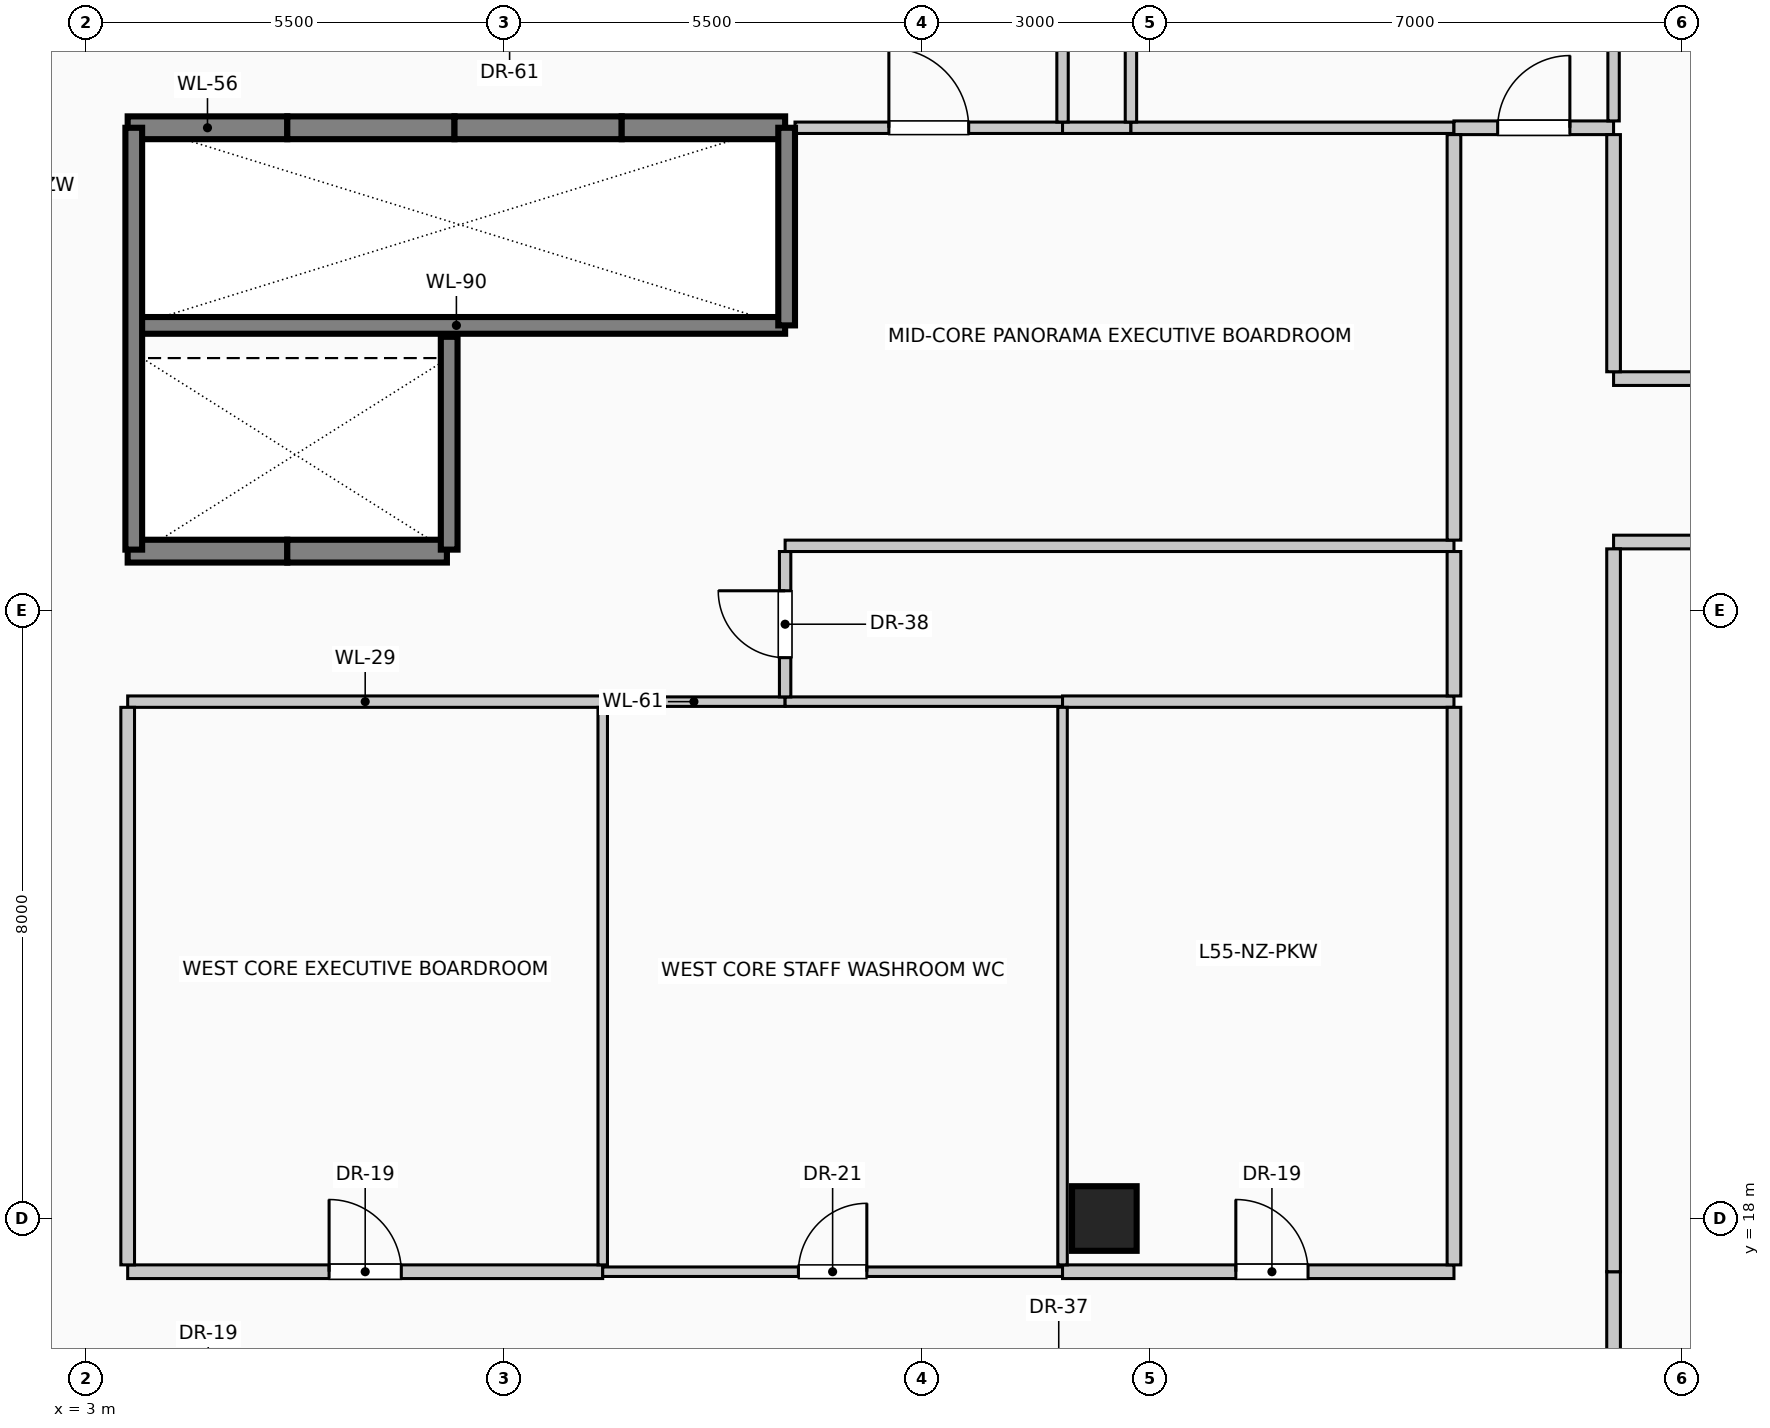
"""IFC4 building model, lengths in metres.
Left out: names, types, materials, properties, quantities, classifications, styles, units other than length and angle.
Written with IfcOpenShell. Run it as: python <this file> out.ifc"""

import sys

from ifc_helpers import new_model, si_unit, direction, frame, frame_2d, origin, origin_2d, place, context, subcontext, project, spatial, rectangle, circle, extrude, element, fill, save


model = new_model("IFC4")
c1 = context("Model", 3, precision=1e-05, world=origin(), true_north=direction((0.0, 1.0)))
c2 = subcontext(c1, "Body", "Model", "MODEL_VIEW")
j1 = project(units=[si_unit("LENGTHUNIT", "METRE"), si_unit("PLANEANGLEUNIT", "RADIAN")], contexts=[c1])
p1 = place(None, origin())
s1 = spatial("IfcSite", under=j1, at=p1, CompositionType="ELEMENT")
p2 = place(p1, origin())
s2 = spatial("IfcBuilding", under=s1, at=p2, CompositionType="ELEMENT")
p3 = place(p2, frame((0.0, 0.0, 226.6)))
s3 = spatial("IfcBuildingStorey", under=s2, at=p3, CompositionType="ELEMENT", Elevation=226.6)
p4 = place(p3, frame((16.4, 18.0, 0.0), z_axis=(0.0, 0.0, 1.0), x_axis=(1.0, 0.0, 0.0)))
e1 = element("IfcColumn", 1, at=p4, inside=s3, PredefinedType="COLUMN", context=c2, shape_type="SweptSolid", body=[
    extrude(circle(Radius=0.425, at=origin_2d()), origin(), (0.0, 0.0, 1.0), 4.0),
])
p5 = place(p3, frame((3.55, 32.35, 0.0), z_axis=(0.0, 0.0, 1.0), x_axis=(1.0, 0.0, 0.0)))
e2 = element("IfcWall", 2, at=p5, inside=s3, PredefinedType="SOLIDWALL", context=c2, shape_type="SweptSolid", body=[
    extrude(rectangle(XDim=2.1, YDim=0.3, at=frame_2d((1.05, 0.0))), origin(), (0.0, 0.0, 1.0), 4.0),
])
p6 = place(p3, frame((5.65, 32.35, 0.0), z_axis=(0.0, 0.0, 1.0), x_axis=(1.0, 0.0, 0.0)))
e3 = element("IfcWall", 3, at=p6, inside=s3, PredefinedType="SOLIDWALL", context=c2, shape_type="SweptSolid", body=[
    extrude(rectangle(XDim=2.2, YDim=0.3, at=frame_2d((1.1, 0.0))), origin(), (0.0, 0.0, 1.0), 4.0),
])
p7 = place(p3, frame((7.85, 32.35, 0.0), z_axis=(0.0, 0.0, 1.0), x_axis=(1.0, 0.0, 0.0)))
e4 = element("IfcWall", 4, at=p7, inside=s3, PredefinedType="SOLIDWALL", context=c2, shape_type="SweptSolid", body=[
    extrude(rectangle(XDim=2.2, YDim=0.3, at=frame_2d((1.1, 0.0))), origin(), (0.0, 0.0, 1.0), 4.0),
])
p8 = place(p3, frame((10.05, 32.35, 0.0), z_axis=(0.0, 0.0, 1.0), x_axis=(1.0, 0.0, 0.0)))
e5 = element("IfcWall", 5, at=p8, inside=s3, PredefinedType="SOLIDWALL", context=c2, shape_type="SweptSolid", body=[
    extrude(rectangle(XDim=2.15, YDim=0.3, at=frame_2d((1.075, 0.0))), origin(), (0.0, 0.0, 1.0), 4.0),
])
p9 = place(p3, frame((5.65, 26.78, 0.0), z_axis=(0.0, 0.0, 1.0), x_axis=(-1.0, 0.0, 0.0)))
e6 = element("IfcWall", 6, at=p9, inside=s3, PredefinedType="SOLIDWALL", context=c2, shape_type="SweptSolid", body=[
    extrude(rectangle(XDim=2.1, YDim=0.3, at=frame_2d((1.05, 0.0))), origin(), (0.0, 0.0, 1.0), 4.0),
])
p10 = place(p3, frame((7.75, 26.78, 0.0), z_axis=(0.0, 0.0, 1.0), x_axis=(-1.0, 0.0, 0.0)))
e7 = element("IfcWall", 7, at=p10, inside=s3, PredefinedType="SOLIDWALL", context=c2, shape_type="SweptSolid", body=[
    extrude(rectangle(XDim=2.1, YDim=0.3, at=frame_2d((1.05, 0.0))), origin(), (0.0, 0.0, 1.0), 4.0),
])
p11 = place(p3, frame((3.55, 29.75, 0.0), z_axis=(0.0, 0.0, 1.0), x_axis=(1.0, 0.0, 0.0)))
e8 = element("IfcWall", 8, at=p11, inside=s3, PredefinedType="SOLIDWALL", context=c2, shape_type="SweptSolid", body=[
    extrude(rectangle(XDim=8.65, YDim=0.22, at=frame_2d((4.325, 0.0))), origin(), (0.0, 0.0, 1.0), 4.0),
])
p12 = place(p3, frame((3.63, 26.8, 0.0), z_axis=(0.0, 0.0, 1.0), x_axis=(0.0, 1.0, 0.0)))
e9 = element("IfcWall", 9, at=p12, inside=s3, PredefinedType="SOLIDWALL", context=c2, shape_type="SweptSolid", body=[
    extrude(rectangle(XDim=5.55, YDim=0.22, at=frame_2d((2.775, 0.0))), origin(), (0.0, 0.0, 1.0), 4.0),
])
p13 = place(p3, frame((7.78, 26.8, 0.0), z_axis=(0.0, 0.0, 1.0), x_axis=(0.0, 1.0, 0.0)))
e10 = element("IfcWall", 10, at=p13, inside=s3, PredefinedType="SOLIDWALL", context=c2, shape_type="SweptSolid", body=[
    extrude(rectangle(XDim=2.8, YDim=0.22, at=frame_2d((1.4, 0.0))), origin(), (0.0, 0.0, 1.0), 4.0),
])
p14 = place(p3, frame((12.22, 29.75, 0.0), z_axis=(0.0, 0.0, 1.0), x_axis=(0.0, 1.0, 0.0)))
e11 = element("IfcWall", 11, at=p14, inside=s3, PredefinedType="SOLIDWALL", context=c2, shape_type="SweptSolid", body=[
    extrude(rectangle(XDim=2.6, YDim=0.22, at=frame_2d((1.3, 0.0))), origin(), (0.0, 0.0, 1.0), 4.0),
])
p15 = place(p3, frame((3.55, 17.3, 0.0), z_axis=(0.0, 0.0, 1.0), x_axis=(1.0, 0.0, 0.0)))
e12 = element("IfcWall", 12, at=p15, inside=s3, PredefinedType="PARTITIONING", context=c2, shape_type="SweptSolid", body=[
    extrude(rectangle(XDim=6.25, YDim=0.18, at=frame_2d((3.125, 0.0))), origin(), (0.0, 0.0, 1.0), 3.75),
])
p16 = place(p15, frame((2.65, 0.0, 0.0)))
e13 = element("IfcOpeningElement", 13, at=p16, cuts=e12, PredefinedType="OPENING", context=c2, shape_type="SweptSolid", body=[
    extrude(rectangle(XDim=0.95, YDim=2.15, at=frame_2d((0.475, 1.075))), frame((0.0, 0.1, 0.0), z_axis=(0.0, -1.0, 0.0), x_axis=(1.0, 0.0, 0.0)), (0.0, 0.0, 1.0), 0.2),
])
p17 = place(p3, frame((9.8, 17.3, 0.0), z_axis=(0.0, 0.0, 1.0), x_axis=(1.0, 0.0, 0.0)))
e14 = element("IfcWall", 14, at=p17, inside=s3, PredefinedType="PARTITIONING", context=c2, shape_type="SweptSolid", body=[
    extrude(rectangle(XDim=6.05, YDim=0.125, at=frame_2d((3.025, 0.0))), origin(), (0.0, 0.0, 1.0), 3.75),
])
p18 = place(p17, frame((2.575, 0.0, 0.0)))
e15 = element("IfcOpeningElement", 15, at=p18, cuts=e14, PredefinedType="OPENING", context=c2, shape_type="SweptSolid", body=[
    extrude(rectangle(XDim=0.9, YDim=2.1, at=frame_2d((0.45, 1.05))), frame((0.0, 0.073, 0.0), z_axis=(0.0, -1.0, 0.0), x_axis=(1.0, 0.0, 0.0)), (0.0, 0.0, 1.0), 0.145),
])
p19 = place(p3, frame((15.85, 17.3, 0.0), z_axis=(0.0, 0.0, 1.0), x_axis=(1.0, 0.0, 0.0)))
e16 = element("IfcWall", 16, at=p19, inside=s3, PredefinedType="PARTITIONING", context=c2, shape_type="SweptSolid", body=[
    extrude(rectangle(XDim=5.15, YDim=0.18, at=frame_2d((2.575, 0.0))), origin(), (0.0, 0.0, 1.0), 3.75),
])
p20 = place(p19, frame((2.28, 0.0, 0.0)))
e17 = element("IfcOpeningElement", 17, at=p20, cuts=e16, PredefinedType="OPENING", context=c2, shape_type="SweptSolid", body=[
    extrude(rectangle(XDim=0.95, YDim=2.15, at=frame_2d((0.475, 1.075))), frame((0.0, 0.1, 0.0), z_axis=(0.0, -1.0, 0.0), x_axis=(1.0, 0.0, 0.0)), (0.0, 0.0, 1.0), 0.2),
])
p21 = place(p3, frame((3.55, 24.8, 0.0), z_axis=(0.0, 0.0, 1.0), x_axis=(1.0, 0.0, 0.0)))
e18 = element("IfcWall", 18, at=p21, inside=s3, PredefinedType="PARTITIONING", context=c2, shape_type="SweptSolid", body=[
    extrude(rectangle(XDim=6.25, YDim=0.15, at=frame_2d((3.125, 0.0))), origin(), (0.0, 0.0, 1.0), 3.75),
])
p22 = place(p3, frame((9.8, 24.8, 0.0), z_axis=(0.0, 0.0, 1.0), x_axis=(1.0, 0.0, 0.0)))
e19 = element("IfcWall", 19, at=p22, inside=s3, PredefinedType="PARTITIONING", context=c2, shape_type="SweptSolid", body=[
    extrude(rectangle(XDim=2.4, YDim=0.125, at=frame_2d((1.2, 0.0))), origin(), (0.0, 0.0, 1.0), 3.75),
])
p23 = place(p3, frame((12.2, 24.8, 0.0), z_axis=(0.0, 0.0, 1.0), x_axis=(1.0, 0.0, 0.0)))
e20 = element("IfcWall", 20, at=p23, inside=s3, PredefinedType="PARTITIONING", context=c2, shape_type="SweptSolid", body=[
    extrude(rectangle(XDim=3.65, YDim=0.125, at=frame_2d((1.825, 0.0))), origin(), (0.0, 0.0, 1.0), 3.75),
])
p24 = place(p3, frame((15.85, 24.8, 0.0), z_axis=(0.0, 0.0, 1.0), x_axis=(1.0, 0.0, 0.0)))
e21 = element("IfcWall", 21, at=p24, inside=s3, PredefinedType="PARTITIONING", context=c2, shape_type="SweptSolid", body=[
    extrude(rectangle(XDim=5.15, YDim=0.15, at=frame_2d((2.575, 0.0))), origin(), (0.0, 0.0, 1.0), 3.75),
])
p25 = place(p3, frame((12.2, 26.85, 0.0), z_axis=(0.0, 0.0, 1.0), x_axis=(1.0, 0.0, 0.0)))
e22 = element("IfcWall", 22, at=p25, inside=s3, PredefinedType="PARTITIONING", context=c2, shape_type="SweptSolid", body=[
    extrude(rectangle(XDim=8.8, YDim=0.15, at=frame_2d((4.4, 0.0))), origin(), (0.0, 0.0, 1.0), 3.75),
])
p26 = place(p3, frame((23.1, 26.9, 0.0), z_axis=(0.0, 0.0, 1.0), x_axis=(1.0, 0.0, 0.0)))
e23 = element("IfcWall", 23, at=p26, inside=s3, PredefinedType="PARTITIONING", context=c2, shape_type="SweptSolid", body=[
    extrude(rectangle(XDim=9.1, YDim=0.18, at=frame_2d((4.55, 0.0))), origin(), (0.0, 0.0, 1.0), 3.75),
])
p27 = place(p26, frame((4.075, 0.0, 0.0)))
e24 = element("IfcOpeningElement", 24, at=p27, cuts=e23, PredefinedType="OPENING", context=c2, shape_type="SweptSolid", body=[
    extrude(rectangle(XDim=0.95, YDim=2.15, at=frame_2d((0.475, 1.075))), frame((0.0, 0.1, 0.0), z_axis=(0.0, -1.0, 0.0), x_axis=(1.0, 0.0, 0.0)), (0.0, 0.0, 1.0), 0.2),
])
p28 = place(p3, frame((23.1, 29.05, 0.0), z_axis=(0.0, 0.0, 1.0), x_axis=(1.0, 0.0, 0.0)))
e25 = element("IfcWall", 25, at=p28, inside=s3, PredefinedType="PARTITIONING", context=c2, shape_type="SweptSolid", body=[
    extrude(rectangle(XDim=3.66, YDim=0.18, at=frame_2d((1.83, 0.0))), origin(), (0.0, 0.0, 1.0), 3.75),
])
p29 = place(p28, frame((1.355, 0.0, 0.0)))
e26 = element("IfcOpeningElement", 26, at=p29, cuts=e25, PredefinedType="OPENING", context=c2, shape_type="SweptSolid", body=[
    extrude(rectangle(XDim=0.95, YDim=2.15, at=frame_2d((0.475, 1.075))), frame((0.0, 0.1, 0.0), z_axis=(0.0, -1.0, 0.0), x_axis=(1.0, 0.0, 0.0)), (0.0, 0.0, 1.0), 0.2),
])
p30 = place(p3, frame((12.33, 32.35, 0.0), z_axis=(0.0, 0.0, 1.0), x_axis=(1.0, 0.0, 0.0)))
e27 = element("IfcWall", 27, at=p30, inside=s3, PredefinedType="PARTITIONING", context=c2, shape_type="SweptSolid", body=[
    extrude(rectangle(XDim=3.52, YDim=0.15, at=frame_2d((1.76, 0.0))), origin(), (0.0, 0.0, 1.0), 3.75),
])
p31 = place(p30, frame((1.235, 0.0, 0.0)))
e28 = element("IfcOpeningElement", 28, at=p31, cuts=e27, PredefinedType="OPENING", context=c2, shape_type="SweptSolid", body=[
    extrude(rectangle(XDim=1.05, YDim=2.15, at=frame_2d((0.525, 1.075))), frame((0.0, 0.085, 0.0), z_axis=(0.0, -1.0, 0.0), x_axis=(1.0, 0.0, 0.0)), (0.0, 0.0, 1.0), 0.17),
])
p32 = place(p3, frame((15.85, 32.35, 0.0), z_axis=(0.0, 0.0, 1.0), x_axis=(1.0, 0.0, 0.0)))
e29 = element("IfcWall", 29, at=p32, inside=s3, PredefinedType="PARTITIONING", context=c2, shape_type="SweptSolid", body=[
    extrude(rectangle(XDim=0.9, YDim=0.15, at=frame_2d((0.45, 0.0))), origin(), (0.0, 0.0, 1.0), 3.75),
])
p33 = place(p3, frame((16.75, 32.35, 0.0), z_axis=(0.0, 0.0, 1.0), x_axis=(1.0, 0.0, 0.0)))
e30 = element("IfcWall", 30, at=p33, inside=s3, PredefinedType="PARTITIONING", context=c2, shape_type="SweptSolid", body=[
    extrude(rectangle(XDim=4.25, YDim=0.15, at=frame_2d((2.125, 0.0))), origin(), (0.0, 0.0, 1.0), 3.75),
])
p34 = place(p3, frame((21.0, 32.35, 0.0), z_axis=(0.0, 0.0, 1.0), x_axis=(1.0, 0.0, 0.0)))
e31 = element("IfcWall", 31, at=p34, inside=s3, PredefinedType="PARTITIONING", context=c2, shape_type="SweptSolid", body=[
    extrude(rectangle(XDim=2.1, YDim=0.18, at=frame_2d((1.05, 0.0))), origin(), (0.0, 0.0, 1.0), 3.75),
])
p35 = place(p34, frame((0.575, 0.0, 0.0)))
e32 = element("IfcOpeningElement", 32, at=p35, cuts=e31, PredefinedType="OPENING", context=c2, shape_type="SweptSolid", body=[
    extrude(rectangle(XDim=0.95, YDim=2.15, at=frame_2d((0.475, 1.075))), frame((0.0, 0.1, 0.0), z_axis=(0.0, -1.0, 0.0), x_axis=(1.0, 0.0, 0.0)), (0.0, 0.0, 1.0), 0.2),
])
p36 = place(p3, frame((3.55, 17.39, 0.0), z_axis=(0.0, 0.0, 1.0), x_axis=(0.0, 1.0, 0.0)))
e33 = element("IfcWall", 33, at=p36, inside=s3, PredefinedType="PARTITIONING", context=c2, shape_type="SweptSolid", body=[
    extrude(rectangle(XDim=7.335, YDim=0.18, at=frame_2d((3.667, 0.0))), origin(), (0.0, 0.0, 1.0), 3.75),
])
p37 = place(p3, frame((9.8, 17.39, 0.0), z_axis=(0.0, 0.0, 1.0), x_axis=(0.0, 1.0, 0.0)))
e34 = element("IfcWall", 34, at=p37, inside=s3, PredefinedType="PARTITIONING", context=c2, shape_type="SweptSolid", body=[
    extrude(rectangle(XDim=7.335, YDim=0.125, at=frame_2d((3.667, 0.0))), origin(), (0.0, 0.0, 1.0), 3.75),
])
p38 = place(p3, frame((12.2, 24.863, 0.0), z_axis=(0.0, 0.0, 1.0), x_axis=(0.0, 1.0, 0.0)))
e35 = element("IfcWall", 35, at=p38, inside=s3, PredefinedType="PARTITIONING", context=c2, shape_type="SweptSolid", body=[
    extrude(rectangle(XDim=1.912, YDim=0.15, at=frame_2d((0.956, 0.0))), origin(), (0.0, 0.0, 1.0), 3.75),
])
p39 = place(p38, frame((0.516, 0.0, 0.0)))
e36 = element("IfcOpeningElement", 36, at=p39, cuts=e35, PredefinedType="OPENING", context=c2, shape_type="SweptSolid", body=[
    extrude(rectangle(XDim=0.88, YDim=2.1, at=frame_2d((0.44, 1.05))), frame((0.0, 0.085, 0.0), z_axis=(0.0, -1.0, 0.0), x_axis=(1.0, 0.0, 0.0)), (0.0, 0.0, 1.0), 0.17),
])
p40 = place(p3, frame((15.85, 17.39, 0.0), z_axis=(0.0, 0.0, 1.0), x_axis=(0.0, 1.0, 0.0)))
e37 = element("IfcWall", 37, at=p40, inside=s3, PredefinedType="PARTITIONING", context=c2, shape_type="SweptSolid", body=[
    extrude(rectangle(XDim=7.335, YDim=0.125, at=frame_2d((3.667, 0.0))), origin(), (0.0, 0.0, 1.0), 3.75),
])
p41 = place(p3, frame((15.85, 32.425, 0.0), z_axis=(0.0, 0.0, 1.0), x_axis=(0.0, 1.0, 0.0)))
e38 = element("IfcWall", 38, at=p41, inside=s3, PredefinedType="PARTITIONING", context=c2, shape_type="SweptSolid", body=[
    extrude(rectangle(XDim=1.725, YDim=0.15, at=frame_2d((0.862, 0.0))), origin(), (0.0, 0.0, 1.0), 3.75),
])
p42 = place(p3, frame((16.75, 32.425, 0.0), z_axis=(0.0, 0.0, 1.0), x_axis=(0.0, 1.0, 0.0)))
e39 = element("IfcWall", 39, at=p42, inside=s3, PredefinedType="PARTITIONING", context=c2, shape_type="SweptSolid", body=[
    extrude(rectangle(XDim=1.15, YDim=0.15, at=frame_2d((0.575, 0.0))), origin(), (0.0, 0.0, 1.0), 3.75),
])
p43 = place(p3, frame((21.0, 17.39, 0.0), z_axis=(0.0, 0.0, 1.0), x_axis=(0.0, 1.0, 0.0)))
e40 = element("IfcWall", 40, at=p43, inside=s3, PredefinedType="PARTITIONING", context=c2, shape_type="SweptSolid", body=[
    extrude(rectangle(XDim=7.335, YDim=0.18, at=frame_2d((3.667, 0.0))), origin(), (0.0, 0.0, 1.0), 3.75),
])
p44 = place(p3, frame((21.0, 24.875, 0.0), z_axis=(0.0, 0.0, 1.0), x_axis=(0.0, 1.0, 0.0)))
e41 = element("IfcWall", 41, at=p44, inside=s3, PredefinedType="PARTITIONING", context=c2, shape_type="SweptSolid", body=[
    extrude(rectangle(XDim=1.9, YDim=0.18, at=frame_2d((0.95, 0.0))), origin(), (0.0, 0.0, 1.0), 3.75),
])
p45 = place(p3, frame((21.0, 26.925, 0.0), z_axis=(0.0, 0.0, 1.0), x_axis=(0.0, 1.0, 0.0)))
e42 = element("IfcWall", 42, at=p45, inside=s3, PredefinedType="PARTITIONING", context=c2, shape_type="SweptSolid", body=[
    extrude(rectangle(XDim=5.335, YDim=0.18, at=frame_2d((2.667, 0.0))), origin(), (0.0, 0.0, 1.0), 3.75),
])
p46 = place(p3, frame((23.1, 15.29, 0.0), z_axis=(0.0, 0.0, 1.0), x_axis=(0.0, 1.0, 0.0)))
e43 = element("IfcWall", 43, at=p46, inside=s3, PredefinedType="PARTITIONING", context=c2, shape_type="SweptSolid", body=[
    extrude(rectangle(XDim=2.01, YDim=0.18, at=frame_2d((1.005, 0.0))), origin(), (0.0, 0.0, 1.0), 3.75),
])
p47 = place(p3, frame((23.1, 17.3, 0.0), z_axis=(0.0, 0.0, 1.0), x_axis=(0.0, 1.0, 0.0)))
e44 = element("IfcWall", 44, at=p47, inside=s3, PredefinedType="PARTITIONING", context=c2, shape_type="SweptSolid", body=[
    extrude(rectangle(XDim=9.51, YDim=0.18, at=frame_2d((4.755, 0.0))), origin(), (0.0, 0.0, 1.0), 3.75),
])
p48 = place(p3, frame((23.1, 29.14, 0.0), z_axis=(0.0, 0.0, 1.0), x_axis=(0.0, 1.0, 0.0)))
e45 = element("IfcWall", 45, at=p48, inside=s3, PredefinedType="PARTITIONING", context=c2, shape_type="SweptSolid", body=[
    extrude(rectangle(XDim=3.12, YDim=0.18, at=frame_2d((1.56, 0.0))), origin(), (0.0, 0.0, 1.0), 3.75),
])
p49 = place(p3, frame((23.1, 32.44, 0.0), z_axis=(0.0, 0.0, 1.0), x_axis=(0.0, 1.0, 0.0)))
e46 = element("IfcWall", 46, at=p49, inside=s3, PredefinedType="PARTITIONING", context=c2, shape_type="SweptSolid", body=[
    extrude(rectangle(XDim=12.84, YDim=0.15, at=frame_2d((6.42, 0.0))), origin(), (0.0, 0.0, 1.0), 3.75),
])
p50 = place(p16, origin())
e47 = element("IfcDoor", 47, at=p50, inside=s3, OperationType="SINGLE_SWING_LEFT", PredefinedType="DOOR", context=c2, shape_type="SweptSolid", body=[
    extrude(rectangle(XDim=0.95, YDim=2.15, at=frame_2d((0.475, 1.075))), frame((0.0, 0.025, 0.0), z_axis=(0.0, -1.0, 0.0), x_axis=(1.0, 0.0, 0.0)), (0.0, 0.0, 1.0), 0.05),
])
fill(e13, e47)
p51 = place(p18, origin())
e48 = element("IfcDoor", 48, at=p51, inside=s3, OperationType="SINGLE_SWING_RIGHT", PredefinedType="DOOR", context=c2, shape_type="SweptSolid", body=[
    extrude(rectangle(XDim=0.9, YDim=2.1, at=frame_2d((0.45, 1.05))), frame((0.0, 0.025, 0.0), z_axis=(0.0, -1.0, 0.0), x_axis=(1.0, 0.0, 0.0)), (0.0, 0.0, 1.0), 0.05),
])
fill(e15, e48)
p52 = place(p20, origin())
e49 = element("IfcDoor", 49, at=p52, inside=s3, OperationType="SINGLE_SWING_LEFT", PredefinedType="DOOR", context=c2, shape_type="SweptSolid", body=[
    extrude(rectangle(XDim=0.95, YDim=2.15, at=frame_2d((0.475, 1.075))), frame((0.0, 0.025, 0.0), z_axis=(0.0, -1.0, 0.0), x_axis=(1.0, 0.0, 0.0)), (0.0, 0.0, 1.0), 0.05),
])
fill(e17, e49)
p53 = place(p31, origin())
e50 = element("IfcDoor", 50, at=p53, inside=s3, OperationType="SINGLE_SWING_LEFT", PredefinedType="DOOR", context=c2, shape_type="SweptSolid", body=[
    extrude(rectangle(XDim=1.05, YDim=2.15, at=frame_2d((0.525, 1.075))), frame((0.0, 0.025, 0.0), z_axis=(0.0, -1.0, 0.0), x_axis=(1.0, 0.0, 0.0)), (0.0, 0.0, 1.0), 0.05),
])
fill(e28, e50)
p54 = place(p35, origin())
e51 = element("IfcDoor", 51, at=p54, inside=s3, OperationType="SINGLE_SWING_RIGHT", PredefinedType="DOOR", context=c2, shape_type="SweptSolid", body=[
    extrude(rectangle(XDim=0.95, YDim=2.15, at=frame_2d((0.475, 1.075))), frame((0.0, 0.025, 0.0), z_axis=(0.0, -1.0, 0.0), x_axis=(1.0, 0.0, 0.0)), (0.0, 0.0, 1.0), 0.05),
])
fill(e32, e51)
p55 = place(p39, origin())
e52 = element("IfcDoor", 52, at=p55, inside=s3, OperationType="SINGLE_SWING_RIGHT", PredefinedType="DOOR", context=c2, shape_type="SweptSolid", body=[
    extrude(rectangle(XDim=0.88, YDim=2.1, at=frame_2d((0.44, 1.05))), frame((0.0, 0.025, 0.0), z_axis=(0.0, -1.0, 0.0), x_axis=(1.0, 0.0, 0.0)), (0.0, 0.0, 1.0), 0.05),
])
fill(e36, e52)
save(model, sys.argv[1])
